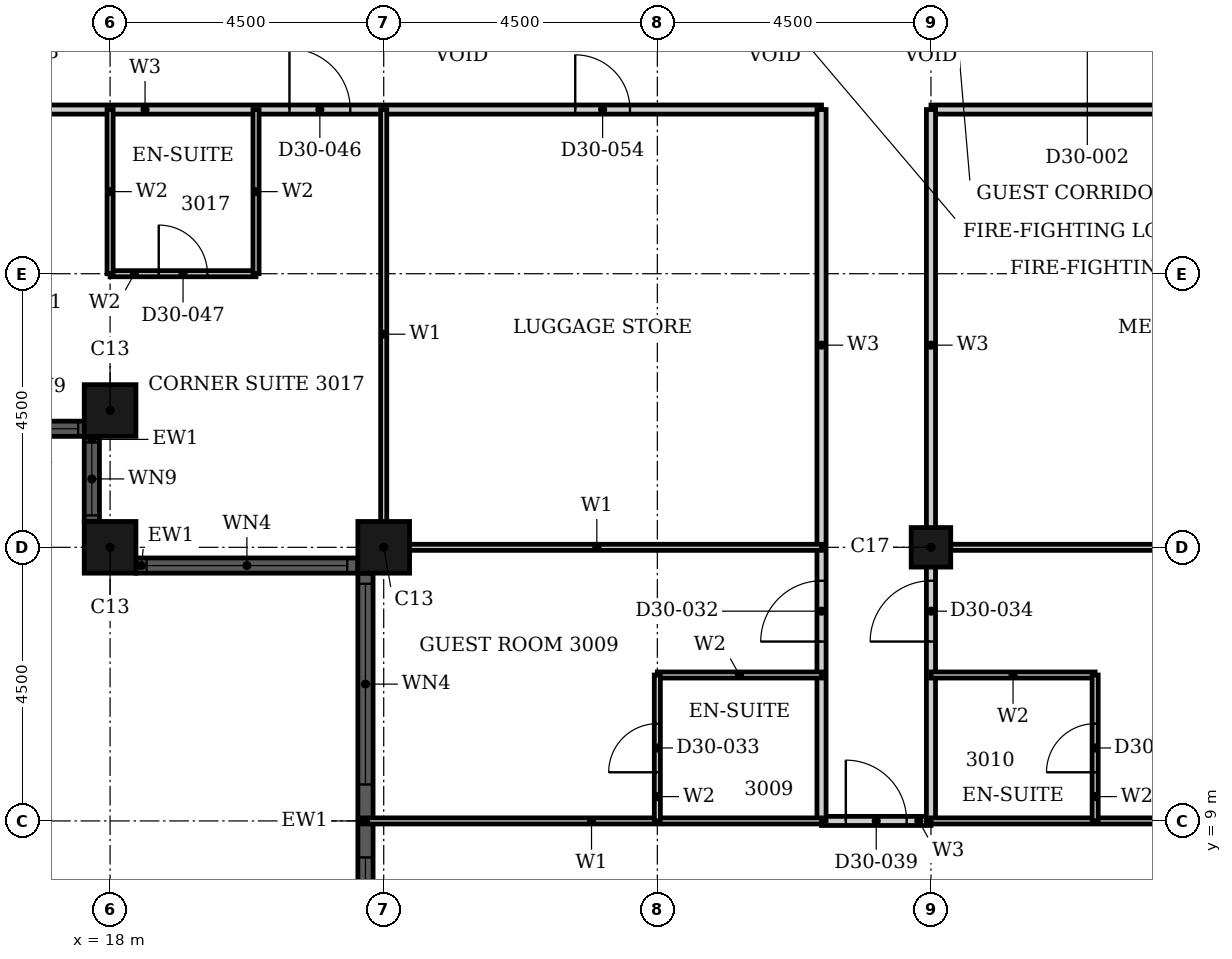
"""IFC4 building model, lengths in metres.
Left out: names, types, materials, properties, quantities, classifications, styles, units other than length and angle.
Written with IfcOpenShell. Run it as: python <this file> out.ifc"""

import sys

from ifc_helpers import new_model, si_unit, direction, frame, frame_2d, origin, origin_2d, place, context, subcontext, project, spatial, rectangle, hollow_rectangle, extrude, element, fill, save


model = new_model("IFC4")
c1 = context("Model", 3, precision=1e-05, world=origin(), true_north=direction((0.0, 1.0)))
c2 = subcontext(c1, "Body", "Model", "MODEL_VIEW")
j1 = project(units=[si_unit("LENGTHUNIT", "METRE"), si_unit("PLANEANGLEUNIT", "RADIAN")], contexts=[c1])
p1 = place(None, origin())
s1 = spatial("IfcSite", under=j1, at=p1, CompositionType="ELEMENT")
p2 = place(p1, origin())
s2 = spatial("IfcBuilding", under=s1, at=p2, CompositionType="ELEMENT")
p3 = place(p2, frame((0.0, 0.0, 122.4)))
s3 = spatial("IfcBuildingStorey", under=s2, at=p3, CompositionType="ELEMENT", Elevation=122.4)
for number, where, z_axis, x_axis in (
    (1, (18.0, 15.75, 0.0), (0.0, 0.0, 1.0), (1.0, 0.0, 0.0)),
    (2, (18.0, 13.5, 0.0), (0.0, 0.0, 1.0), (1.0, 0.0, 0.0)),
    (3, (22.5, 13.5, 0.0), (0.0, 0.0, 1.0), (1.0, 0.0, 0.0)),
):
    element("IfcColumn", number, at=place(p3, frame(where, z_axis=z_axis, x_axis=x_axis)), inside=s3, PredefinedType="COLUMN", context=c2, shape_type="SweptSolid", body=[
        extrude(hollow_rectangle(XDim=0.85, YDim=0.85, WallThickness=0.026, at=origin_2d()), origin(), (0.0, 0.0, 1.0), 3.6),
    ])
p4 = place(p3, frame((31.5, 13.5, 0.0), z_axis=(0.0, 0.0, 1.0), x_axis=(1.0, 0.0, 0.0)))
e4 = element("IfcColumn", 4, at=p4, inside=s3, PredefinedType="COLUMN", context=c2, shape_type="SweptSolid", body=[
    extrude(hollow_rectangle(XDim=0.65, YDim=0.65, WallThickness=0.021, at=origin_2d()), origin(), (0.0, 0.0, 1.0), 3.6),
])
p5 = place(p3, frame((16.175, 15.45, 0.0), z_axis=(0.0, 0.0, 1.0), x_axis=(1.0, 0.0, 0.0)))
e5 = element("IfcWall", 5, at=p5, inside=s3, PredefinedType="SOLIDWALL", context=c2, shape_type="SweptSolid", body=[
    extrude(rectangle(XDim=1.4, YDim=0.25, at=frame_2d((0.7, 0.0))), origin(), (0.0, 0.0, 1.0), 3.6),
])
p6 = place(p5, frame((0.1, 0.0, 0.9)))
e6 = element("IfcOpeningElement", 6, at=p6, cuts=e5, PredefinedType="OPENING", context=c2, shape_type="SweptSolid", body=[
    extrude(rectangle(XDim=1.2, YDim=2.08, at=frame_2d((0.6, 1.04))), frame((0.0, 0.135, 0.0), z_axis=(0.0, -1.0, 0.0), x_axis=(1.0, 0.0, 0.0)), (0.0, 0.0, 1.0), 0.27),
])
p7 = place(p3, frame((17.7, 15.325, 0.0), z_axis=(0.0, 0.0, 1.0), x_axis=(0.0, -1.0, 0.0)))
e7 = element("IfcWall", 7, at=p7, inside=s3, PredefinedType="SOLIDWALL", context=c2, shape_type="SweptSolid", body=[
    extrude(rectangle(XDim=1.4, YDim=0.25, at=frame_2d((0.7, 0.0))), origin(), (0.0, 0.0, 1.0), 3.6),
])
p8 = place(p7, frame((0.1, 0.0, 0.9)))
e8 = element("IfcOpeningElement", 8, at=p8, cuts=e7, PredefinedType="OPENING", context=c2, shape_type="SweptSolid", body=[
    extrude(rectangle(XDim=1.2, YDim=2.08, at=frame_2d((0.6, 1.04))), frame((0.0, 0.135, 0.0), z_axis=(0.0, -1.0, 0.0), x_axis=(1.0, 0.0, 0.0)), (0.0, 0.0, 1.0), 0.27),
])
p9 = place(p3, frame((18.425, 13.2, 0.0), z_axis=(0.0, 0.0, 1.0), x_axis=(1.0, 0.0, 0.0)))
e9 = element("IfcWall", 9, at=p9, inside=s3, PredefinedType="SOLIDWALL", context=c2, shape_type="SweptSolid", body=[
    extrude(rectangle(XDim=3.65, YDim=0.25, at=frame_2d((1.825, 0.0))), origin(), (0.0, 0.0, 1.0), 3.6),
])
p10 = place(p9, frame((0.175, 0.0, 0.9)))
e10 = element("IfcOpeningElement", 10, at=p10, cuts=e9, PredefinedType="OPENING", context=c2, shape_type="SweptSolid", body=[
    extrude(rectangle(XDim=3.3, YDim=2.08, at=frame_2d((1.65, 1.04))), frame((0.0, 0.135, 0.0), z_axis=(0.0, -1.0, 0.0), x_axis=(1.0, 0.0, 0.0)), (0.0, 0.0, 1.0), 0.27),
])
p11 = place(p3, frame((22.2, 13.075, 0.0), z_axis=(0.0, 0.0, 1.0), x_axis=(0.0, -1.0, 0.0)))
e11 = element("IfcWall", 11, at=p11, inside=s3, PredefinedType="SOLIDWALL", context=c2, shape_type="SweptSolid", body=[
    extrude(rectangle(XDim=8.15, YDim=0.25, at=frame_2d((4.075, 0.0))), origin(), (0.0, 0.0, 1.0), 3.6),
])
p12 = place(p11, frame((0.175, 0.0, 0.9)))
e12 = element("IfcOpeningElement", 12, at=p12, cuts=e11, PredefinedType="OPENING", context=c2, shape_type="SweptSolid", body=[
    extrude(rectangle(XDim=3.3, YDim=2.08, at=frame_2d((1.65, 1.04))), frame((0.0, 0.135, 0.0), z_axis=(0.0, -1.0, 0.0), x_axis=(1.0, 0.0, 0.0)), (0.0, 0.0, 1.0), 0.27),
])
p13 = place(p11, frame((4.675, 0.0, 0.9)))
e13 = element("IfcOpeningElement", 13, at=p13, cuts=e11, PredefinedType="OPENING", context=c2, shape_type="SweptSolid", body=[
    extrude(rectangle(XDim=3.3, YDim=2.08, at=frame_2d((1.65, 1.04))), frame((0.0, 0.135, 0.0), z_axis=(0.0, -1.0, 0.0), x_axis=(1.0, 0.0, 0.0)), (0.0, 0.0, 1.0), 0.27),
])
p14 = place(p3, frame((16.2, 20.7, 0.0), z_axis=(0.0, 0.0, 1.0), x_axis=(1.0, 0.0, 0.0)))
e14 = element("IfcWall", 14, at=p14, inside=s3, PredefinedType="PARTITIONING", context=c2, shape_type="SweptSolid", body=[
    extrude(rectangle(XDim=13.5, YDim=0.15, at=frame_2d((6.75, 0.0))), origin(), (0.0, 0.0, 1.0), 3.3),
])
p15 = place(p14, frame((4.75, 0.0, 0.0)))
e15 = element("IfcOpeningElement", 15, at=p15, cuts=e14, PredefinedType="OPENING", context=c2, shape_type="SweptSolid", body=[
    extrude(rectangle(XDim=1.0, YDim=2.1, at=frame_2d((0.5, 1.05))), frame((0.0, 0.085, 0.0), z_axis=(0.0, -1.0, 0.0), x_axis=(1.0, 0.0, 0.0)), (0.0, 0.0, 1.0), 0.17),
])
p16 = place(p14, frame((9.45, 0.0, 0.0)))
e16 = element("IfcOpeningElement", 16, at=p16, cuts=e14, PredefinedType="OPENING", context=c2, shape_type="SweptSolid", body=[
    extrude(rectangle(XDim=0.9, YDim=2.1, at=frame_2d((0.45, 1.05))), frame((0.0, 0.085, 0.0), z_axis=(0.0, -1.0, 0.0), x_axis=(1.0, 0.0, 0.0)), (0.0, 0.0, 1.0), 0.17),
])
p17 = place(p3, frame((31.5, 20.7, 0.0), z_axis=(0.0, 0.0, 1.0), x_axis=(1.0, 0.0, 0.0)))
e17 = element("IfcWall", 17, at=p17, inside=s3, PredefinedType="PARTITIONING", context=c2, shape_type="SweptSolid", body=[
    extrude(rectangle(XDim=15.3, YDim=0.15, at=frame_2d((7.65, 0.0))), origin(), (0.0, 0.0, 1.0), 3.3),
])
p18 = place(p17, frame((11.95, 0.0, 0.0)))
e18 = element("IfcOpeningElement", 18, at=p18, cuts=e17, PredefinedType="OPENING", context=c2, shape_type="SweptSolid", body=[
    extrude(rectangle(XDim=1.0, YDim=2.1, at=frame_2d((0.5, 1.05))), frame((0.0, 0.085, 0.0), z_axis=(0.0, -1.0, 0.0), x_axis=(1.0, 0.0, 0.0)), (0.0, 0.0, 1.0), 0.17),
])
p19 = place(p17, frame((4.05, 0.0, 0.0)))
e19 = element("IfcOpeningElement", 19, at=p19, cuts=e17, PredefinedType="OPENING", context=c2, shape_type="SweptSolid", body=[
    extrude(rectangle(XDim=0.9, YDim=2.1, at=frame_2d((0.45, 1.05))), frame((0.0, 0.085, 0.0), z_axis=(0.0, -1.0, 0.0), x_axis=(1.0, 0.0, 0.0)), (0.0, 0.0, 1.0), 0.17),
])
p20 = place(p3, frame((29.7, 9.0, 0.0), z_axis=(0.0, 0.0, 1.0), x_axis=(1.0, 0.0, 0.0)))
e20 = element("IfcWall", 20, at=p20, inside=s3, PredefinedType="PARTITIONING", context=c2, shape_type="SweptSolid", body=[
    extrude(rectangle(XDim=1.8, YDim=0.15, at=frame_2d((0.9, 0.0))), origin(), (0.0, 0.0, 1.0), 3.3),
])
p21 = place(p20, frame((0.4, 0.0, 0.0)))
e21 = element("IfcOpeningElement", 21, at=p21, cuts=e20, PredefinedType="OPENING", context=c2, shape_type="SweptSolid", body=[
    extrude(rectangle(XDim=1.0, YDim=2.1, at=frame_2d((0.5, 1.05))), frame((0.0, 0.085, 0.0), z_axis=(0.0, -1.0, 0.0), x_axis=(1.0, 0.0, 0.0)), (0.0, 0.0, 1.0), 0.17),
])
p22 = place(p3, frame((29.7, 9.0, 0.0), z_axis=(0.0, 0.0, 1.0), x_axis=(0.0, 1.0, 0.0)))
e22 = element("IfcWall", 22, at=p22, inside=s3, PredefinedType="PARTITIONING", context=c2, shape_type="SweptSolid", body=[
    extrude(rectangle(XDim=11.7, YDim=0.15, at=frame_2d((5.85, 0.0))), origin(), (0.0, 0.0, 1.0), 3.3),
])
p23 = place(p22, frame((2.95, 0.0, 0.0)))
e23 = element("IfcOpeningElement", 23, at=p23, cuts=e22, PredefinedType="OPENING", context=c2, shape_type="SweptSolid", body=[
    extrude(rectangle(XDim=1.0, YDim=2.1, at=frame_2d((0.5, 1.05))), frame((0.0, 0.085, 0.0), z_axis=(0.0, -1.0, 0.0), x_axis=(1.0, 0.0, 0.0)), (0.0, 0.0, 1.0), 0.17),
])
p24 = place(p3, frame((31.5, 9.0, 0.0), z_axis=(0.0, 0.0, 1.0), x_axis=(0.0, 1.0, 0.0)))
e24 = element("IfcWall", 24, at=p24, inside=s3, PredefinedType="PARTITIONING", context=c2, shape_type="SweptSolid", body=[
    extrude(rectangle(XDim=11.7, YDim=0.15, at=frame_2d((5.85, 0.0))), origin(), (0.0, 0.0, 1.0), 2.58),
])
p25 = place(p24, frame((2.95, 0.0, 0.0)))
e25 = element("IfcOpeningElement", 25, at=p25, cuts=e24, PredefinedType="OPENING", context=c2, shape_type="SweptSolid", body=[
    extrude(rectangle(XDim=1.0, YDim=2.1, at=frame_2d((0.5, 1.05))), frame((0.0, 0.085, 0.0), z_axis=(0.0, -1.0, 0.0), x_axis=(1.0, 0.0, 0.0)), (0.0, 0.0, 1.0), 0.17),
])
p26 = place(p3, frame((31.5, 13.5, 0.0), z_axis=(0.0, 0.0, 1.0), x_axis=(1.0, 0.0, 0.0)))
e26 = element("IfcWall", 26, at=p26, inside=s3, PredefinedType="PARTITIONING", context=c2, shape_type="SweptSolid", body=[
    extrude(rectangle(XDim=9.19, YDim=0.1, at=frame_2d((4.595, 0.0))), origin(), (0.0, 0.0, 1.0), 2.38),
])
p27 = place(p3, frame((22.31, 13.5, 0.0), z_axis=(0.0, 0.0, 1.0), x_axis=(1.0, 0.0, 0.0)))
e27 = element("IfcWall", 27, at=p27, inside=s3, PredefinedType="PARTITIONING", context=c2, shape_type="SweptSolid", body=[
    extrude(rectangle(XDim=7.39, YDim=0.1, at=frame_2d((3.695, 0.0))), origin(), (0.0, 0.0, 1.0), 2.38),
])
p28 = place(p3, frame((31.5, 9.0, 0.0), z_axis=(0.0, 0.0, 1.0), x_axis=(1.0, 0.0, 0.0)))
e28 = element("IfcWall", 28, at=p28, inside=s3, PredefinedType="PARTITIONING", context=c2, shape_type="SweptSolid", body=[
    extrude(rectangle(XDim=9.365, YDim=0.1, at=frame_2d((4.683, 0.0))), origin(), (0.0, 0.0, 1.0), 3.3),
])
p29 = place(p3, frame((22.135, 9.0, 0.0), z_axis=(0.0, 0.0, 1.0), x_axis=(1.0, 0.0, 0.0)))
e29 = element("IfcWall", 29, at=p29, inside=s3, PredefinedType="PARTITIONING", context=c2, shape_type="SweptSolid", body=[
    extrude(rectangle(XDim=7.565, YDim=0.1, at=frame_2d((3.782, 0.0))), origin(), (0.0, 0.0, 1.0), 3.3),
])
p30 = place(p3, frame((22.5, 13.31, 0.0), z_axis=(0.0, 0.0, 1.0), x_axis=(0.0, 1.0, 0.0)))
e30 = element("IfcWall", 30, at=p30, inside=s3, PredefinedType="PARTITIONING", context=c2, shape_type="SweptSolid", body=[
    extrude(rectangle(XDim=7.39, YDim=0.1, at=frame_2d((3.695, 0.0))), origin(), (0.0, 0.0, 1.0), 3.3),
])
for number, where, z_axis, x_axis in (
    (31, (31.5, 11.4, 0.0), (0.0, 0.0, 1.0), (1.0, 0.0, 0.0)),
    (32, (27.0, 11.4, 0.0), (0.0, 0.0, 1.0), (1.0, 0.0, 0.0)),
):
    element("IfcWall", number, at=place(p3, frame(where, z_axis=z_axis, x_axis=x_axis)), inside=s3, PredefinedType="PARTITIONING", context=c2, shape_type="SweptSolid", body=[
        extrude(rectangle(XDim=2.7, YDim=0.1, at=frame_2d((1.35, 0.0))), origin(), (0.0, 0.0, 1.0), 3.3),
    ])
p31 = place(p3, frame((18.0, 18.0, 0.0), z_axis=(0.0, 0.0, 1.0), x_axis=(1.0, 0.0, 0.0)))
e33 = element("IfcWall", 33, at=p31, inside=s3, PredefinedType="PARTITIONING", context=c2, shape_type="SweptSolid", body=[
    extrude(rectangle(XDim=2.4, YDim=0.1, at=frame_2d((1.2, 0.0))), origin(), (0.0, 0.0, 1.0), 3.3),
])
p32 = place(p31, frame((0.8, 0.0, 0.0)))
e34 = element("IfcOpeningElement", 34, at=p32, cuts=e33, PredefinedType="OPENING", context=c2, shape_type="SweptSolid", body=[
    extrude(rectangle(XDim=0.8, YDim=2.1, at=frame_2d((0.4, 1.05))), frame((0.0, 0.06, 0.0), z_axis=(0.0, -1.0, 0.0), x_axis=(1.0, 0.0, 0.0)), (0.0, 0.0, 1.0), 0.12),
])
for number, where, z_axis, x_axis in (
    (35, (18.0, 18.0, 0.0), (0.0, 0.0, 1.0), (0.0, 1.0, 0.0)),
    (36, (20.4, 18.0, 0.0), (0.0, 0.0, 1.0), (0.0, 1.0, 0.0)),
):
    element("IfcWall", number, at=place(p3, frame(where, z_axis=z_axis, x_axis=x_axis)), inside=s3, PredefinedType="PARTITIONING", context=c2, shape_type="SweptSolid", body=[
        extrude(rectangle(XDim=2.7, YDim=0.1, at=frame_2d((1.35, 0.0))), origin(), (0.0, 0.0, 1.0), 3.3),
    ])
p33 = place(p3, frame((27.0, 9.0, 0.0), z_axis=(0.0, 0.0, 1.0), x_axis=(0.0, 1.0, 0.0)))
e37 = element("IfcWall", 37, at=p33, inside=s3, PredefinedType="PARTITIONING", context=c2, shape_type="SweptSolid", body=[
    extrude(rectangle(XDim=2.4, YDim=0.1, at=frame_2d((1.2, 0.0))), origin(), (0.0, 0.0, 1.0), 2.58),
])
p34 = place(p33, frame((0.8, 0.0, 0.0)))
e38 = element("IfcOpeningElement", 38, at=p34, cuts=e37, PredefinedType="OPENING", context=c2, shape_type="SweptSolid", body=[
    extrude(rectangle(XDim=0.8, YDim=2.1, at=frame_2d((0.4, 1.05))), frame((0.0, 0.06, 0.0), z_axis=(0.0, -1.0, 0.0), x_axis=(1.0, 0.0, 0.0)), (0.0, 0.0, 1.0), 0.12),
])
p35 = place(p3, frame((34.2, 9.0, 0.0), z_axis=(0.0, 0.0, 1.0), x_axis=(0.0, 1.0, 0.0)))
e39 = element("IfcWall", 39, at=p35, inside=s3, PredefinedType="PARTITIONING", context=c2, shape_type="SweptSolid", body=[
    extrude(rectangle(XDim=2.4, YDim=0.1, at=frame_2d((1.2, 0.0))), origin(), (0.0, 0.0, 1.0), 3.3),
])
p36 = place(p35, frame((0.8, 0.0, 0.0)))
e40 = element("IfcOpeningElement", 40, at=p36, cuts=e39, PredefinedType="OPENING", context=c2, shape_type="SweptSolid", body=[
    extrude(rectangle(XDim=0.8, YDim=2.1, at=frame_2d((0.4, 1.05))), frame((0.0, 0.06, 0.0), z_axis=(0.0, -1.0, 0.0), x_axis=(1.0, 0.0, 0.0)), (0.0, 0.0, 1.0), 0.12),
])
p37 = place(p6, origin())
e41 = element("IfcWindow", 41, at=p37, inside=s3, PartitioningType="SINGLE_PANEL", PredefinedType="WINDOW", context=c2, shape_type="SweptSolid", body=[
    extrude(rectangle(XDim=1.2, YDim=2.08, at=frame_2d((0.6, 1.04))), frame((0.0, 0.03, 0.0), z_axis=(0.0, -1.0, 0.0), x_axis=(1.0, 0.0, 0.0)), (0.0, 0.0, 1.0), 0.06),
])
fill(e6, e41)
p38 = place(p8, origin())
e42 = element("IfcWindow", 42, at=p38, inside=s3, PartitioningType="SINGLE_PANEL", PredefinedType="WINDOW", context=c2, shape_type="SweptSolid", body=[
    extrude(rectangle(XDim=1.2, YDim=2.08, at=frame_2d((0.6, 1.04))), frame((0.0, 0.03, 0.0), z_axis=(0.0, -1.0, 0.0), x_axis=(1.0, 0.0, 0.0)), (0.0, 0.0, 1.0), 0.06),
])
fill(e8, e42)
p39 = place(p10, origin())
e43 = element("IfcWindow", 43, at=p39, inside=s3, PartitioningType="SINGLE_PANEL", PredefinedType="WINDOW", context=c2, shape_type="SweptSolid", body=[
    extrude(rectangle(XDim=3.3, YDim=2.08, at=frame_2d((1.65, 1.04))), frame((0.0, 0.03, 0.0), z_axis=(0.0, -1.0, 0.0), x_axis=(1.0, 0.0, 0.0)), (0.0, 0.0, 1.0), 0.06),
])
fill(e10, e43)
p40 = place(p12, origin())
e44 = element("IfcWindow", 44, at=p40, inside=s3, PartitioningType="SINGLE_PANEL", PredefinedType="WINDOW", context=c2, shape_type="SweptSolid", body=[
    extrude(rectangle(XDim=3.3, YDim=2.08, at=frame_2d((1.65, 1.04))), frame((0.0, 0.03, 0.0), z_axis=(0.0, -1.0, 0.0), x_axis=(1.0, 0.0, 0.0)), (0.0, 0.0, 1.0), 0.06),
])
fill(e12, e44)
p41 = place(p13, origin())
e45 = element("IfcWindow", 45, at=p41, inside=s3, PartitioningType="SINGLE_PANEL", PredefinedType="WINDOW", context=c2, shape_type="SweptSolid", body=[
    extrude(rectangle(XDim=3.3, YDim=2.08, at=frame_2d((1.65, 1.04))), frame((0.0, 0.03, 0.0), z_axis=(0.0, -1.0, 0.0), x_axis=(1.0, 0.0, 0.0)), (0.0, 0.0, 1.0), 0.06),
])
fill(e13, e45)
p42 = place(p23, origin())
e46 = element("IfcDoor", 46, at=p42, inside=s3, OperationType="SINGLE_SWING_RIGHT", PredefinedType="DOOR", context=c2, shape_type="SweptSolid", body=[
    extrude(rectangle(XDim=1.0, YDim=2.1, at=frame_2d((0.5, 1.05))), frame((0.0, 0.025, 0.0), z_axis=(0.0, -1.0, 0.0), x_axis=(1.0, 0.0, 0.0)), (0.0, 0.0, 1.0), 0.05),
])
fill(e23, e46)
p43 = place(p34, origin())
e47 = element("IfcDoor", 47, at=p43, inside=s3, OperationType="SINGLE_SWING_RIGHT", PredefinedType="DOOR", context=c2, shape_type="SweptSolid", body=[
    extrude(rectangle(XDim=0.8, YDim=2.1, at=frame_2d((0.4, 1.05))), frame((0.0, 0.025, 0.0), z_axis=(0.0, -1.0, 0.0), x_axis=(1.0, 0.0, 0.0)), (0.0, 0.0, 1.0), 0.05),
])
fill(e38, e47)
p44 = place(p25, origin())
e48 = element("IfcDoor", 48, at=p44, inside=s3, OperationType="SINGLE_SWING_RIGHT", PredefinedType="DOOR", context=c2, shape_type="SweptSolid", body=[
    extrude(rectangle(XDim=1.0, YDim=2.1, at=frame_2d((0.5, 1.05))), frame((0.0, 0.025, 0.0), z_axis=(0.0, -1.0, 0.0), x_axis=(1.0, 0.0, 0.0)), (0.0, 0.0, 1.0), 0.05),
])
fill(e25, e48)
p45 = place(p36, origin())
e49 = element("IfcDoor", 49, at=p45, inside=s3, OperationType="SINGLE_SWING_LEFT", PredefinedType="DOOR", context=c2, shape_type="SweptSolid", body=[
    extrude(rectangle(XDim=0.8, YDim=2.1, at=frame_2d((0.4, 1.05))), frame((0.0, 0.025, 0.0), z_axis=(0.0, -1.0, 0.0), x_axis=(1.0, 0.0, 0.0)), (0.0, 0.0, 1.0), 0.05),
])
fill(e40, e49)
p46 = place(p21, origin())
e50 = element("IfcDoor", 50, at=p46, inside=s3, OperationType="SINGLE_SWING_RIGHT", PredefinedType="DOOR", context=c2, shape_type="SweptSolid", body=[
    extrude(rectangle(XDim=1.0, YDim=2.1, at=frame_2d((0.5, 1.05))), frame((0.0, 0.025, 0.0), z_axis=(0.0, -1.0, 0.0), x_axis=(1.0, 0.0, 0.0)), (0.0, 0.0, 1.0), 0.05),
])
fill(e21, e50)
p47 = place(p15, origin())
e51 = element("IfcDoor", 51, at=p47, inside=s3, OperationType="SINGLE_SWING_RIGHT", PredefinedType="DOOR", context=c2, shape_type="SweptSolid", body=[
    extrude(rectangle(XDim=1.0, YDim=2.1, at=frame_2d((0.5, 1.05))), frame((0.0, 0.025, 0.0), z_axis=(0.0, -1.0, 0.0), x_axis=(1.0, 0.0, 0.0)), (0.0, 0.0, 1.0), 0.05),
])
fill(e15, e51)
p48 = place(p32, origin())
e52 = element("IfcDoor", 52, at=p48, inside=s3, OperationType="SINGLE_SWING_LEFT", PredefinedType="DOOR", context=c2, shape_type="SweptSolid", body=[
    extrude(rectangle(XDim=0.8, YDim=2.1, at=frame_2d((0.4, 1.05))), frame((0.0, 0.025, 0.0), z_axis=(0.0, -1.0, 0.0), x_axis=(1.0, 0.0, 0.0)), (0.0, 0.0, 1.0), 0.05),
])
fill(e34, e52)
p49 = place(p16, origin())
e53 = element("IfcDoor", 53, at=p49, inside=s3, OperationType="SINGLE_SWING_LEFT", PredefinedType="DOOR", context=c2, shape_type="SweptSolid", body=[
    extrude(rectangle(XDim=0.9, YDim=2.1, at=frame_2d((0.45, 1.05))), frame((0.0, 0.025, 0.0), z_axis=(0.0, -1.0, 0.0), x_axis=(1.0, 0.0, 0.0)), (0.0, 0.0, 1.0), 0.05),
])
fill(e16, e53)
save(model, sys.argv[1])
